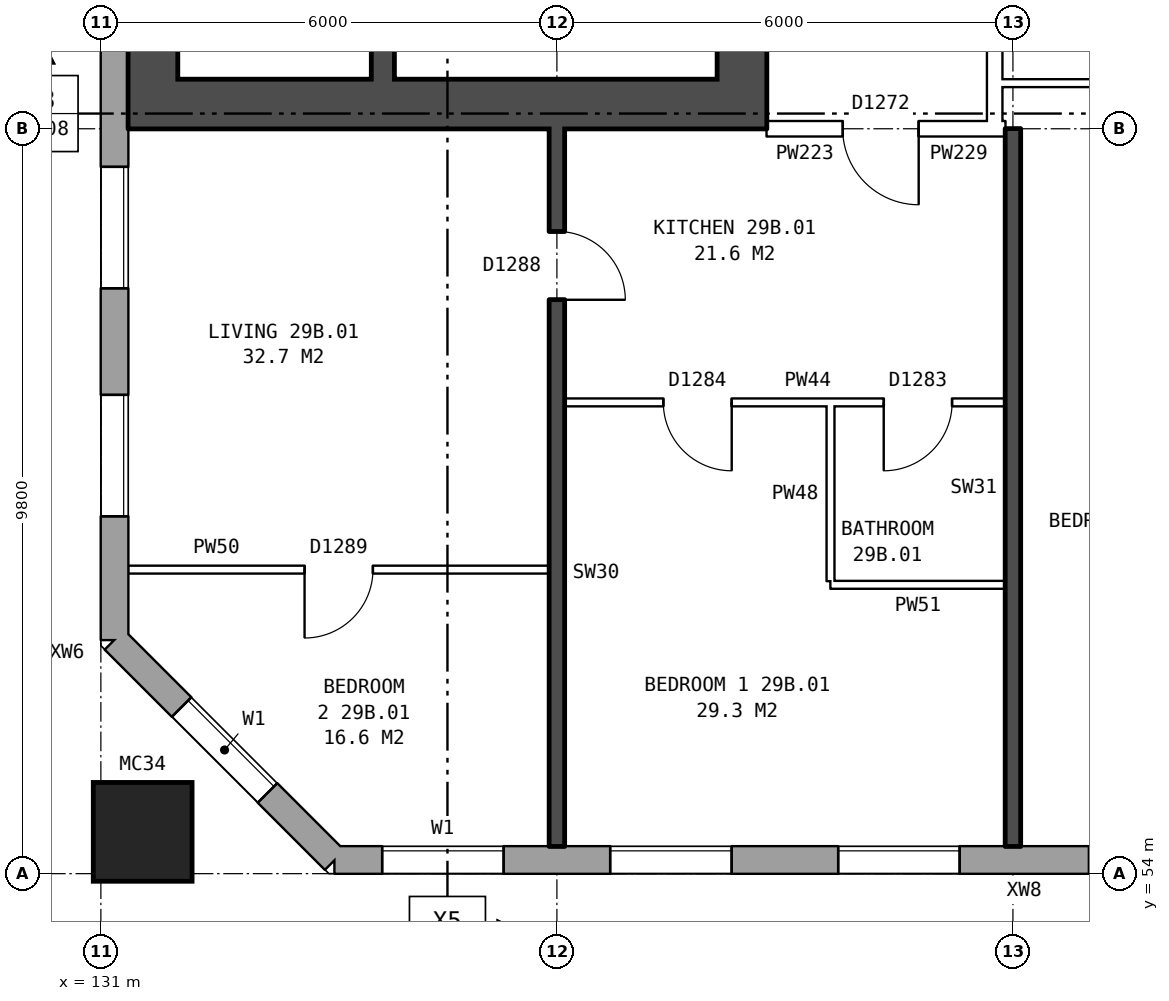
"""IFC4 building model, lengths in metres.
Left out: names, types, materials, properties, quantities, classifications, styles, units other than length and angle.
Written with IfcOpenShell. Run it as: python <this file> out.ifc"""

import sys

from ifc_helpers import new_model, si_unit, direction, frame, frame_2d, origin, origin_2d, place, context, subcontext, project, spatial, rectangle, hollow_rectangle, extrude, element, fill, save


model = new_model("IFC4")
c1 = context("Model", 3, precision=1e-05, world=origin(), true_north=direction((0.0, 1.0)))
c2 = subcontext(c1, "Body", "Model", "MODEL_VIEW")
j1 = project(units=[si_unit("LENGTHUNIT", "METRE"), si_unit("PLANEANGLEUNIT", "RADIAN")], contexts=[c1])
p1 = place(None, origin())
s1 = spatial("IfcSite", under=j1, at=p1, CompositionType="ELEMENT")
p2 = place(p1, origin())
s2 = spatial("IfcBuilding", under=s1, at=p2, CompositionType="ELEMENT")
p3 = place(p2, frame((0.0, 0.0, 105.7)))
s3 = spatial("IfcBuildingStorey", under=s2, at=p3, CompositionType="ELEMENT", Elevation=105.7)
p4 = place(p3, frame((131.55, 54.55, 0.0), z_axis=(0.0, 0.0, 1.0), x_axis=(1.0, 0.0, 0.0)))
e1 = element("IfcColumn", 1, at=p4, inside=s3, PredefinedType="COLUMN", context=c2, shape_type="SweptSolid", body=[
    extrude(hollow_rectangle(XDim=1.3, YDim=1.3, WallThickness=0.07, at=origin_2d()), origin(), (0.0, 0.0, 1.0), 3.1),
])
p5 = place(p3, frame((131.18, 57.075, 0.0), z_axis=(0.0, 0.0, 1.0), x_axis=(0.707106781187, -0.707106781187, 0.0)))
e2 = element("IfcWall", 2, at=p5, inside=s3, PredefinedType="STANDARD", context=c2, shape_type="SweptSolid", body=[
    extrude(rectangle(XDim=4.094, YDim=0.36, at=frame_2d((2.047, 0.0))), origin(), (0.0, 0.0, 1.0), 2.85),
])
p6 = place(p5, frame((1.247, 0.0, 0.8)))
e3 = element("IfcOpeningElement", 3, at=p6, cuts=e2, PredefinedType="OPENING", context=c2, shape_type="SweptSolid", body=[
    extrude(rectangle(XDim=1.6, YDim=1.8, at=frame_2d((0.8, 0.9))), frame((0.0, 0.19, 0.0), z_axis=(0.0, -1.0, 0.0), x_axis=(1.0, 0.0, 0.0)), (0.0, 0.0, 1.0), 0.38),
])
p7 = place(p3, frame((134.075, 54.18, 0.0), z_axis=(0.0, 0.0, 1.0), x_axis=(1.0, 0.0, 0.0)))
e4 = element("IfcWall", 4, at=p7, inside=s3, PredefinedType="STANDARD", context=c2, shape_type="SweptSolid", body=[
    extrude(rectangle(XDim=36.851, YDim=0.36, at=frame_2d((18.425, 0.0))), origin(), (0.0, 0.0, 1.0), 2.85),
])
p8 = place(p7, frame((0.625, 0.0, 0.8)))
e5 = element("IfcOpeningElement", 5, at=p8, cuts=e4, PredefinedType="OPENING", context=c2, shape_type="SweptSolid", body=[
    extrude(rectangle(XDim=1.6, YDim=1.8, at=frame_2d((0.8, 0.9))), frame((0.0, 0.19, 0.0), z_axis=(0.0, -1.0, 0.0), x_axis=(1.0, 0.0, 0.0)), (0.0, 0.0, 1.0), 0.38),
])
p9 = place(p7, frame((3.625, 0.0, 0.8)))
e6 = element("IfcOpeningElement", 6, at=p9, cuts=e4, PredefinedType="OPENING", context=c2, shape_type="SweptSolid", body=[
    extrude(rectangle(XDim=1.6, YDim=1.8, at=frame_2d((0.8, 0.9))), frame((0.0, 0.19, 0.0), z_axis=(0.0, -1.0, 0.0), x_axis=(1.0, 0.0, 0.0)), (0.0, 0.0, 1.0), 0.38),
])
p10 = place(p7, frame((6.625, 0.0, 0.8)))
e7 = element("IfcOpeningElement", 7, at=p10, cuts=e4, PredefinedType="OPENING", context=c2, shape_type="SweptSolid", body=[
    extrude(rectangle(XDim=1.6, YDim=1.8, at=frame_2d((0.8, 0.9))), frame((0.0, 0.19, 0.0), z_axis=(0.0, -1.0, 0.0), x_axis=(1.0, 0.0, 0.0)), (0.0, 0.0, 1.0), 0.38),
])
p11 = place(p7, frame((9.925, 0.0, 0.15)))
e8 = element("IfcOpeningElement", 8, at=p11, cuts=e4, PredefinedType="OPENING", context=c2, shape_type="SweptSolid", body=[
    extrude(rectangle(XDim=0.6, YDim=0.9, at=frame_2d((0.3, 0.45))), frame((0.0, 0.19, 0.0), z_axis=(0.0, -1.0, 0.0), x_axis=(1.0, 0.0, 0.0)), (0.0, 0.0, 1.0), 0.38),
])
p12 = place(p7, frame((12.625, 0.0, 0.8)))
e9 = element("IfcOpeningElement", 9, at=p12, cuts=e4, PredefinedType="OPENING", context=c2, shape_type="SweptSolid", body=[
    extrude(rectangle(XDim=1.6, YDim=1.8, at=frame_2d((0.8, 0.9))), frame((0.0, 0.19, 0.0), z_axis=(0.0, -1.0, 0.0), x_axis=(1.0, 0.0, 0.0)), (0.0, 0.0, 1.0), 0.38),
])
p13 = place(p7, frame((15.625, 0.0, 0.8)))
e10 = element("IfcOpeningElement", 10, at=p13, cuts=e4, PredefinedType="OPENING", context=c2, shape_type="SweptSolid", body=[
    extrude(rectangle(XDim=1.6, YDim=1.8, at=frame_2d((0.8, 0.9))), frame((0.0, 0.19, 0.0), z_axis=(0.0, -1.0, 0.0), x_axis=(1.0, 0.0, 0.0)), (0.0, 0.0, 1.0), 0.38),
])
p14 = place(p7, frame((18.625, 0.0, 0.8)))
e11 = element("IfcOpeningElement", 11, at=p14, cuts=e4, PredefinedType="OPENING", context=c2, shape_type="SweptSolid", body=[
    extrude(rectangle(XDim=1.6, YDim=1.8, at=frame_2d((0.8, 0.9))), frame((0.0, 0.19, 0.0), z_axis=(0.0, -1.0, 0.0), x_axis=(1.0, 0.0, 0.0)), (0.0, 0.0, 1.0), 0.38),
])
p15 = place(p7, frame((21.625, 0.0, 0.8)))
e12 = element("IfcOpeningElement", 12, at=p15, cuts=e4, PredefinedType="OPENING", context=c2, shape_type="SweptSolid", body=[
    extrude(rectangle(XDim=1.6, YDim=1.8, at=frame_2d((0.8, 0.9))), frame((0.0, 0.19, 0.0), z_axis=(0.0, -1.0, 0.0), x_axis=(1.0, 0.0, 0.0)), (0.0, 0.0, 1.0), 0.38),
])
p16 = place(p7, frame((23.525, 0.0, 0.8)))
e13 = element("IfcOpeningElement", 13, at=p16, cuts=e4, PredefinedType="OPENING", context=c2, shape_type="SweptSolid", body=[
    extrude(rectangle(XDim=1.6, YDim=1.8, at=frame_2d((0.8, 0.9))), frame((0.0, 0.19, 0.0), z_axis=(0.0, -1.0, 0.0), x_axis=(1.0, 0.0, 0.0)), (0.0, 0.0, 1.0), 0.38),
])
p17 = place(p7, frame((27.625, 0.0, 1.4)))
e14 = element("IfcOpeningElement", 14, at=p17, cuts=e4, PredefinedType="OPENING", context=c2, shape_type="SweptSolid", body=[
    extrude(rectangle(XDim=1.0, YDim=1.2, at=frame_2d((0.5, 0.6))), frame((0.0, 0.19, 0.0), z_axis=(0.0, -1.0, 0.0), x_axis=(1.0, 0.0, 0.0)), (0.0, 0.0, 1.0), 0.38),
])
p18 = place(p7, frame((30.625, 0.0, 0.8)))
e15 = element("IfcOpeningElement", 15, at=p18, cuts=e4, PredefinedType="OPENING", context=c2, shape_type="SweptSolid", body=[
    extrude(rectangle(XDim=1.6, YDim=1.8, at=frame_2d((0.8, 0.9))), frame((0.0, 0.19, 0.0), z_axis=(0.0, -1.0, 0.0), x_axis=(1.0, 0.0, 0.0)), (0.0, 0.0, 1.0), 0.38),
])
p19 = place(p7, frame((33.625, 0.0, 0.8)))
e16 = element("IfcOpeningElement", 16, at=p19, cuts=e4, PredefinedType="OPENING", context=c2, shape_type="SweptSolid", body=[
    extrude(rectangle(XDim=1.6, YDim=1.8, at=frame_2d((0.8, 0.9))), frame((0.0, 0.19, 0.0), z_axis=(0.0, -1.0, 0.0), x_axis=(1.0, 0.0, 0.0)), (0.0, 0.0, 1.0), 0.38),
])
p20 = place(p7, frame((10.975, 0.0, 0.15)))
e17 = element("IfcOpeningElement", 17, at=p20, cuts=e4, PredefinedType="OPENING", context=c2, shape_type="SweptSolid", body=[
    extrude(rectangle(XDim=0.8, YDim=1.8, at=frame_2d((0.4, 0.9))), frame((0.0, 0.19, 0.0), z_axis=(0.0, -1.0, 0.0), x_axis=(1.0, 0.0, 0.0)), (0.0, 0.0, 1.0), 0.38),
])
p21 = place(p7, frame((25.425, 0.0, 0.8)))
e18 = element("IfcOpeningElement", 18, at=p21, cuts=e4, PredefinedType="OPENING", context=c2, shape_type="SweptSolid", body=[
    extrude(rectangle(XDim=0.6, YDim=0.9, at=frame_2d((0.3, 0.45))), frame((0.0, 0.19, 0.0), z_axis=(0.0, -1.0, 0.0), x_axis=(1.0, 0.0, 0.0)), (0.0, 0.0, 1.0), 0.38),
])
p22 = place(p7, frame((28.925, 0.0, 0.8)))
e19 = element("IfcOpeningElement", 19, at=p22, cuts=e4, PredefinedType="OPENING", context=c2, shape_type="SweptSolid", body=[
    extrude(rectangle(XDim=1.4, YDim=1.8, at=frame_2d((0.7, 0.9))), frame((0.0, 0.19, 0.0), z_axis=(0.0, -1.0, 0.0), x_axis=(1.0, 0.0, 0.0)), (0.0, 0.0, 1.0), 0.38),
])
p23 = place(p3, frame((131.18, 82.925, 0.0), z_axis=(0.0, 0.0, 1.0), x_axis=(0.0, -1.0, 0.0)))
e20 = element("IfcWall", 20, at=p23, inside=s3, PredefinedType="STANDARD", context=c2, shape_type="SweptSolid", body=[
    extrude(rectangle(XDim=25.851, YDim=0.36, at=frame_2d((12.925, 0.0))), origin(), (0.0, 0.0, 1.0), 2.85),
])
p24 = place(p23, frame((1.625, 0.0, 0.8)))
e21 = element("IfcOpeningElement", 21, at=p24, cuts=e20, PredefinedType="OPENING", context=c2, shape_type="SweptSolid", body=[
    extrude(rectangle(XDim=1.6, YDim=1.8, at=frame_2d((0.8, 0.9))), frame((0.0, 0.19, 0.0), z_axis=(0.0, -1.0, 0.0), x_axis=(1.0, 0.0, 0.0)), (0.0, 0.0, 1.0), 0.38),
])
p25 = place(p23, frame((4.625, 0.0, 0.8)))
e22 = element("IfcOpeningElement", 22, at=p25, cuts=e20, PredefinedType="OPENING", context=c2, shape_type="SweptSolid", body=[
    extrude(rectangle(XDim=1.6, YDim=1.8, at=frame_2d((0.8, 0.9))), frame((0.0, 0.19, 0.0), z_axis=(0.0, -1.0, 0.0), x_axis=(1.0, 0.0, 0.0)), (0.0, 0.0, 1.0), 0.38),
])
p26 = place(p23, frame((19.625, 0.0, 0.8)))
e23 = element("IfcOpeningElement", 23, at=p26, cuts=e20, PredefinedType="OPENING", context=c2, shape_type="SweptSolid", body=[
    extrude(rectangle(XDim=1.6, YDim=1.8, at=frame_2d((0.8, 0.9))), frame((0.0, 0.19, 0.0), z_axis=(0.0, -1.0, 0.0), x_axis=(1.0, 0.0, 0.0)), (0.0, 0.0, 1.0), 0.38),
])
p27 = place(p23, frame((22.625, 0.0, 0.8)))
e24 = element("IfcOpeningElement", 24, at=p27, cuts=e20, PredefinedType="OPENING", context=c2, shape_type="SweptSolid", body=[
    extrude(rectangle(XDim=1.6, YDim=1.8, at=frame_2d((0.8, 0.9))), frame((0.0, 0.19, 0.0), z_axis=(0.0, -1.0, 0.0), x_axis=(1.0, 0.0, 0.0)), (0.0, 0.0, 1.0), 0.38),
])
p28 = place(p3, frame((139.435, 64.45, 0.0), z_axis=(0.0, 0.0, 1.0), x_axis=(0.0, 1.0, 0.0)))
e25 = element("IfcWall", 25, at=p28, inside=s3, PredefinedType="SHEAR", context=c2, shape_type="SweptSolid", body=[
    extrude(rectangle(XDim=11.1, YDim=0.65, at=frame_2d((5.55, 0.0))), origin(), (0.0, 0.0, 1.0), 2.85),
])
p29 = place(p28, frame((0.675, 0.0, 0.0)))
e26 = element("IfcOpeningElement", 26, at=p29, cuts=e25, PredefinedType="OPENING", context=c2, shape_type="SweptSolid", body=[
    extrude(rectangle(XDim=1.1, YDim=2.1, at=frame_2d((0.55, 1.05))), frame((0.0, 0.335, 0.0), z_axis=(0.0, -1.0, 0.0), x_axis=(1.0, 0.0, 0.0)), (0.0, 0.0, 1.0), 0.67),
])
p30 = place(p28, frame((9.25, 0.0, 0.0)))
e27 = element("IfcOpeningElement", 27, at=p30, cuts=e25, PredefinedType="OPENING", context=c2, shape_type="SweptSolid", body=[
    extrude(rectangle(XDim=1.1, YDim=2.1, at=frame_2d((0.55, 1.05))), frame((0.0, 0.335, 0.0), z_axis=(0.0, -1.0, 0.0), x_axis=(1.0, 0.0, 0.0)), (0.0, 0.0, 1.0), 0.67),
])
p31 = place(p28, frame((7.475, 0.0, 0.0)))
e28 = element("IfcOpeningElement", 28, at=p31, cuts=e25, PredefinedType="OPENING", context=c2, shape_type="SweptSolid", body=[
    extrude(rectangle(XDim=0.85, YDim=2.1, at=frame_2d((0.425, 1.05))), frame((0.0, 0.335, 0.0), z_axis=(0.0, -1.0, 0.0), x_axis=(1.0, 0.0, 0.0)), (0.0, 0.0, 1.0), 0.67),
])
p32 = place(p3, frame((131.685, 64.45, 0.0), z_axis=(0.0, 0.0, 1.0), x_axis=(0.0, 1.0, 0.0)))
e29 = element("IfcWall", 29, at=p32, inside=s3, PredefinedType="SHEAR", context=c2, shape_type="SweptSolid", body=[
    extrude(rectangle(XDim=11.1, YDim=0.65, at=frame_2d((5.55, 0.0))), origin(), (0.0, 0.0, 1.0), 2.85),
])
p33 = place(p3, frame((139.76, 64.125, 0.0), z_axis=(0.0, 0.0, 1.0), x_axis=(-1.0, 0.0, 0.0)))
e30 = element("IfcWall", 30, at=p33, inside=s3, PredefinedType="SHEAR", context=c2, shape_type="SweptSolid", body=[
    extrude(rectangle(XDim=8.4, YDim=0.65, at=frame_2d((4.2, 0.0))), origin(), (0.0, 0.0, 1.0), 2.85),
])
p34 = place(p3, frame((134.71, 64.45, 0.0), z_axis=(0.0, 0.0, 1.0), x_axis=(0.0, 1.0, 0.0)))
e31 = element("IfcWall", 31, at=p34, inside=s3, PredefinedType="SHEAR", context=c2, shape_type="SweptSolid", body=[
    extrude(rectangle(XDim=6.65, YDim=0.3, at=frame_2d((3.325, 0.0))), origin(), (0.0, 0.0, 1.0), 2.85),
])
p35 = place(p3, frame((142.76, 63.9, 0.0), z_axis=(0.0, 0.0, 1.0), x_axis=(0.0, 1.0, 0.0)))
e32 = element("IfcWall", 32, at=p35, inside=s3, PredefinedType="PARTITIONING", context=c2, shape_type="SweptSolid", body=[
    extrude(rectangle(XDim=12.2, YDim=0.2, at=frame_2d((6.1, 0.0))), origin(), (0.0, 0.0, 1.0), 2.85),
])
p36 = place(p35, frame((5.1, 0.0, 0.0)))
e33 = element("IfcOpeningElement", 33, at=p36, cuts=e32, PredefinedType="OPENING", context=c2, shape_type="SweptSolid", body=[
    extrude(rectangle(XDim=2.0, YDim=2.1, at=frame_2d((1.0, 1.05))), frame((0.0, 0.11, 0.0), z_axis=(0.0, -1.0, 0.0), x_axis=(1.0, 0.0, 0.0)), (0.0, 0.0, 1.0), 0.22),
])
p37 = place(p3, frame((140.6, 57.8, 0.0), z_axis=(0.0, 0.0, 1.0), x_axis=(1.0, 0.0, 0.0)))
e34 = element("IfcWall", 34, at=p37, inside=s3, PredefinedType="PARTITIONING", context=c2, shape_type="SweptSolid", body=[
    extrude(rectangle(XDim=2.3, YDim=0.1, at=frame_2d((1.15, 0.0))), origin(), (0.0, 0.0, 1.0), 2.85),
])
p38 = place(p3, frame((131.36, 58.0, 0.0), z_axis=(0.0, 0.0, 1.0), x_axis=(1.0, 0.0, 0.0)))
e35 = element("IfcWall", 35, at=p38, inside=s3, PredefinedType="PARTITIONING", context=c2, shape_type="SweptSolid", body=[
    extrude(rectangle(XDim=5.54, YDim=0.1, at=frame_2d((2.77, 0.0))), origin(), (0.0, 0.0, 1.0), 2.85),
])
p39 = place(p38, frame((2.32, 0.0, 0.0)))
e36 = element("IfcOpeningElement", 36, at=p39, cuts=e35, PredefinedType="OPENING", context=c2, shape_type="SweptSolid", body=[
    extrude(rectangle(XDim=0.9, YDim=2.1, at=frame_2d((0.45, 1.05))), frame((0.0, 0.06, 0.0), z_axis=(0.0, -1.0, 0.0), x_axis=(1.0, 0.0, 0.0)), (0.0, 0.0, 1.0), 0.12),
])
p40 = place(p3, frame((137.1, 60.2, 0.0), z_axis=(0.0, 0.0, 1.0), x_axis=(1.0, 0.0, 0.0)))
e37 = element("IfcWall", 37, at=p40, inside=s3, PredefinedType="PARTITIONING", context=c2, shape_type="SweptSolid", body=[
    extrude(rectangle(XDim=5.8, YDim=0.1, at=frame_2d((2.9, 0.0))), origin(), (0.0, 0.0, 1.0), 2.85),
])
p41 = place(p40, frame((1.3, 0.0, 0.0)))
e38 = element("IfcOpeningElement", 38, at=p41, cuts=e37, PredefinedType="OPENING", context=c2, shape_type="SweptSolid", body=[
    extrude(rectangle(XDim=0.9, YDim=2.1, at=frame_2d((0.45, 1.05))), frame((0.0, 0.06, 0.0), z_axis=(0.0, -1.0, 0.0), x_axis=(1.0, 0.0, 0.0)), (0.0, 0.0, 1.0), 0.12),
])
p42 = place(p40, frame((4.2, 0.0, 0.0)))
e39 = element("IfcOpeningElement", 39, at=p42, cuts=e37, PredefinedType="OPENING", context=c2, shape_type="SweptSolid", body=[
    extrude(rectangle(XDim=0.9, YDim=2.1, at=frame_2d((0.45, 1.05))), frame((0.0, 0.06, 0.0), z_axis=(0.0, -1.0, 0.0), x_axis=(1.0, 0.0, 0.0)), (0.0, 0.0, 1.0), 0.12),
])
p43 = place(p3, frame((139.76, 63.8, 0.0), z_axis=(0.0, 0.0, 1.0), x_axis=(1.0, 0.0, 0.0)))
e40 = element("IfcWall", 40, at=p43, inside=s3, PredefinedType="PARTITIONING", context=c2, shape_type="SweptSolid", body=[
    extrude(rectangle(XDim=3.0, YDim=0.2, at=frame_2d((1.5, 0.0))), origin(), (0.0, 0.0, 1.0), 2.85),
])
p44 = place(p43, frame((1.0, 0.0, 0.0)))
e41 = element("IfcOpeningElement", 41, at=p44, cuts=e40, PredefinedType="OPENING", context=c2, shape_type="SweptSolid", body=[
    extrude(rectangle(XDim=1.0, YDim=2.1, at=frame_2d((0.5, 1.05))), frame((0.0, 0.11, 0.0), z_axis=(0.0, -1.0, 0.0), x_axis=(1.0, 0.0, 0.0)), (0.0, 0.0, 1.0), 0.22),
])
p45 = place(p3, frame((142.76, 63.8, 0.0), z_axis=(0.0, 0.0, 1.0), x_axis=(1.0, 0.0, 0.0)))
e42 = element("IfcWall", 42, at=p45, inside=s3, PredefinedType="PARTITIONING", context=c2, shape_type="SweptSolid", body=[
    extrude(rectangle(XDim=0.14, YDim=0.2, at=frame_2d((0.07, 0.0))), origin(), (0.0, 0.0, 1.0), 2.85),
])
p46 = place(p3, frame((142.76, 64.4, 0.0), z_axis=(0.0, 0.0, 1.0), x_axis=(1.0, 0.0, 0.0)))
e43 = element("IfcWall", 43, at=p46, inside=s3, PredefinedType="PARTITIONING", context=c2, shape_type="SweptSolid", body=[
    extrude(rectangle(XDim=3.24, YDim=0.1, at=frame_2d((1.62, 0.0))), origin(), (0.0, 0.0, 1.0), 2.85),
])
p47 = place(p3, frame((137.0, 54.36, 0.0), z_axis=(0.0, 0.0, 1.0), x_axis=(0.0, 1.0, 0.0)))
e44 = element("IfcWall", 44, at=p47, inside=s3, PredefinedType="SOLIDWALL", context=c2, shape_type="SweptSolid", body=[
    extrude(rectangle(XDim=9.44, YDim=0.2, at=frame_2d((4.72, 0.0))), origin(), (0.0, 0.0, 1.0), 2.85),
])
p48 = place(p47, frame((7.19, 0.0, 0.0)))
e45 = element("IfcOpeningElement", 45, at=p48, cuts=e44, PredefinedType="OPENING", context=c2, shape_type="SweptSolid", body=[
    extrude(rectangle(XDim=0.9, YDim=2.1, at=frame_2d((0.45, 1.05))), frame((0.0, 0.11, 0.0), z_axis=(0.0, -1.0, 0.0), x_axis=(1.0, 0.0, 0.0)), (0.0, 0.0, 1.0), 0.22),
])
p49 = place(p3, frame((140.6, 57.85, 0.0), z_axis=(0.0, 0.0, 1.0), x_axis=(0.0, 1.0, 0.0)))
e46 = element("IfcWall", 46, at=p49, inside=s3, PredefinedType="PARTITIONING", context=c2, shape_type="SweptSolid", body=[
    extrude(rectangle(XDim=2.3, YDim=0.1, at=frame_2d((1.15, 0.0))), origin(), (0.0, 0.0, 1.0), 2.85),
])
p50 = place(p3, frame((143.0, 54.36, 0.0), z_axis=(0.0, 0.0, 1.0), x_axis=(0.0, 1.0, 0.0)))
e47 = element("IfcWall", 47, at=p50, inside=s3, PredefinedType="SOLIDWALL", context=c2, shape_type="SweptSolid", body=[
    extrude(rectangle(XDim=9.44, YDim=0.2, at=frame_2d((4.72, 0.0))), origin(), (0.0, 0.0, 1.0), 2.85),
])
p51 = place(p6, origin())
e48 = element("IfcWindow", 48, at=p51, inside=s3, PartitioningType="SINGLE_PANEL", PredefinedType="WINDOW", context=c2, shape_type="SweptSolid", body=[
    extrude(rectangle(XDim=1.6, YDim=1.8, at=frame_2d((0.8, 0.9))), frame((0.0, 0.15, 0.0), z_axis=(0.0, -1.0, 0.0), x_axis=(1.0, 0.0, 0.0)), (0.0, 0.0, 1.0), 0.06),
])
fill(e3, e48)
p52 = place(p8, origin())
e49 = element("IfcWindow", 49, at=p52, inside=s3, PartitioningType="SINGLE_PANEL", PredefinedType="WINDOW", context=c2, shape_type="SweptSolid", body=[
    extrude(rectangle(XDim=1.6, YDim=1.8, at=frame_2d((0.8, 0.9))), frame((0.0, 0.15, 0.0), z_axis=(0.0, -1.0, 0.0), x_axis=(1.0, 0.0, 0.0)), (0.0, 0.0, 1.0), 0.06),
])
fill(e5, e49)
p53 = place(p9, origin())
e50 = element("IfcWindow", 50, at=p53, inside=s3, PartitioningType="SINGLE_PANEL", PredefinedType="WINDOW", context=c2, shape_type="SweptSolid", body=[
    extrude(rectangle(XDim=1.6, YDim=1.8, at=frame_2d((0.8, 0.9))), frame((0.0, 0.15, 0.0), z_axis=(0.0, -1.0, 0.0), x_axis=(1.0, 0.0, 0.0)), (0.0, 0.0, 1.0), 0.06),
])
fill(e6, e50)
p54 = place(p10, origin())
e51 = element("IfcWindow", 51, at=p54, inside=s3, PartitioningType="SINGLE_PANEL", PredefinedType="WINDOW", context=c2, shape_type="SweptSolid", body=[
    extrude(rectangle(XDim=1.6, YDim=1.8, at=frame_2d((0.8, 0.9))), frame((0.0, 0.15, 0.0), z_axis=(0.0, -1.0, 0.0), x_axis=(1.0, 0.0, 0.0)), (0.0, 0.0, 1.0), 0.06),
])
fill(e7, e51)
p55 = place(p26, origin())
e52 = element("IfcWindow", 52, at=p55, inside=s3, PartitioningType="SINGLE_PANEL", PredefinedType="WINDOW", context=c2, shape_type="SweptSolid", body=[
    extrude(rectangle(XDim=1.6, YDim=1.8, at=frame_2d((0.8, 0.9))), frame((0.0, 0.15, 0.0), z_axis=(0.0, -1.0, 0.0), x_axis=(1.0, 0.0, 0.0)), (0.0, 0.0, 1.0), 0.06),
])
fill(e23, e52)
p56 = place(p27, origin())
e53 = element("IfcWindow", 53, at=p56, inside=s3, PartitioningType="SINGLE_PANEL", PredefinedType="WINDOW", context=c2, shape_type="SweptSolid", body=[
    extrude(rectangle(XDim=1.6, YDim=1.8, at=frame_2d((0.8, 0.9))), frame((0.0, 0.15, 0.0), z_axis=(0.0, -1.0, 0.0), x_axis=(1.0, 0.0, 0.0)), (0.0, 0.0, 1.0), 0.06),
])
fill(e24, e53)
p57 = place(p41, frame((0.9, 0.0, 0.0), z_axis=(0.0, 0.0, 1.0), x_axis=(-1.0, 0.0, 0.0)))
e54 = element("IfcDoor", 54, at=p57, inside=s3, OperationType="SINGLE_SWING_LEFT", PredefinedType="DOOR", context=c2, shape_type="SweptSolid", body=[
    extrude(rectangle(XDim=0.9, YDim=2.1, at=frame_2d((0.45, 1.05))), frame((0.0, 0.025, 0.0), z_axis=(0.0, -1.0, 0.0), x_axis=(1.0, 0.0, 0.0)), (0.0, 0.0, 1.0), 0.05),
])
fill(e38, e54)
p58 = place(p39, frame((0.9, 0.0, 0.0), z_axis=(0.0, 0.0, 1.0), x_axis=(-1.0, 0.0, 0.0)))
e55 = element("IfcDoor", 55, at=p58, inside=s3, OperationType="SINGLE_SWING_RIGHT", PredefinedType="DOOR", context=c2, shape_type="SweptSolid", body=[
    extrude(rectangle(XDim=0.9, YDim=2.1, at=frame_2d((0.45, 1.05))), frame((0.0, 0.025, 0.0), z_axis=(0.0, -1.0, 0.0), x_axis=(1.0, 0.0, 0.0)), (0.0, 0.0, 1.0), 0.05),
])
fill(e36, e55)
p59 = place(p44, frame((1.0, 0.0, 0.0), z_axis=(0.0, 0.0, 1.0), x_axis=(-1.0, 0.0, 0.0)))
e56 = element("IfcDoor", 56, at=p59, inside=s3, OperationType="SINGLE_SWING_LEFT", PredefinedType="DOOR", context=c2, shape_type="SweptSolid", body=[
    extrude(rectangle(XDim=1.0, YDim=2.1, at=frame_2d((0.5, 1.05))), frame((0.0, 0.025, 0.0), z_axis=(0.0, -1.0, 0.0), x_axis=(1.0, 0.0, 0.0)), (0.0, 0.0, 1.0), 0.05),
])
fill(e41, e56)
p60 = place(p48, frame((0.9, 0.0, 0.0), z_axis=(0.0, 0.0, 1.0), x_axis=(-1.0, 0.0, 0.0)))
e57 = element("IfcDoor", 57, at=p60, inside=s3, OperationType="SINGLE_SWING_RIGHT", PredefinedType="DOOR", context=c2, shape_type="SweptSolid", body=[
    extrude(rectangle(XDim=0.9, YDim=2.1, at=frame_2d((0.45, 1.05))), frame((0.0, 0.025, 0.0), z_axis=(0.0, -1.0, 0.0), x_axis=(1.0, 0.0, 0.0)), (0.0, 0.0, 1.0), 0.05),
])
fill(e45, e57)
p61 = place(p42, frame((0.9, 0.0, 0.0), z_axis=(0.0, 0.0, 1.0), x_axis=(-1.0, 0.0, 0.0)))
e58 = element("IfcDoor", 58, at=p61, inside=s3, OperationType="SINGLE_SWING_RIGHT", PredefinedType="DOOR", context=c2, shape_type="SweptSolid", body=[
    extrude(rectangle(XDim=0.9, YDim=2.1, at=frame_2d((0.45, 1.05))), frame((0.0, 0.025, 0.0), z_axis=(0.0, -1.0, 0.0), x_axis=(1.0, 0.0, 0.0)), (0.0, 0.0, 1.0), 0.05),
])
fill(e39, e58)
save(model, sys.argv[1])
